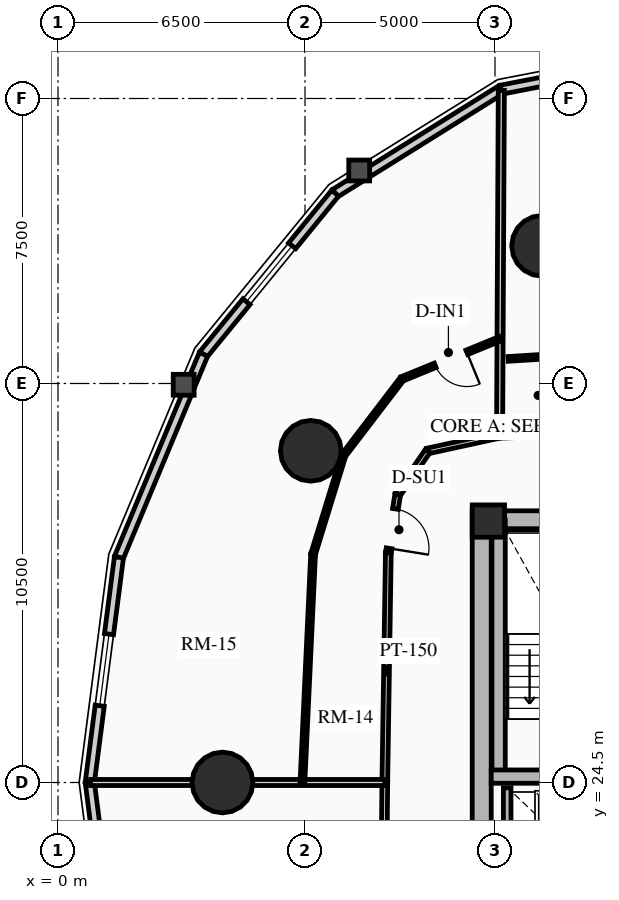
"""IFC4 building model, lengths in metres.
Left out: names, types, materials, properties, quantities, classifications, styles, units other than length and angle.
Written with IfcOpenShell. Run it as: python <this file> out.ifc"""

import sys

from ifc_helpers import new_model, si_unit, direction, frame, frame_2d, origin, origin_2d, place, context, subcontext, project, spatial, rectangle, circle, extrude, source, transform, mapped, element, fill, save


model = new_model("IFC4")
c1 = context("Model", 3, precision=1e-05, world=origin(), true_north=direction((0.0, 1.0)))
c2 = subcontext(c1, "Body", "Model", "MODEL_VIEW")
j1 = project(units=[si_unit("LENGTHUNIT", "METRE"), si_unit("PLANEANGLEUNIT", "RADIAN")], contexts=[c1])
p1 = place(None, origin())
s1 = spatial("IfcSite", under=j1, at=p1, CompositionType="ELEMENT")
p2 = place(p1, origin())
s2 = spatial("IfcBuilding", under=s1, at=p2, CompositionType="ELEMENT")
p3 = place(p2, frame((0.0, 0.0, 62.74)))
s3 = spatial("IfcBuildingStorey", under=s2, at=p3, CompositionType="ELEMENT", Elevation=62.74)
p4 = place(p3, frame((11.15, 17.35, 0.0), z_axis=(0.0, 0.0, 1.0), x_axis=(0.0, 1.0, 0.0)))
e1 = element("IfcWall", 1, at=p4, inside=s3, PredefinedType="SHEAR", context=c2, shape_type="SweptSolid", body=[
    extrude(rectangle(XDim=14.3, YDim=0.5, at=frame_2d((7.15, 0.0))), origin(), (0.0, 0.0, 1.0), 2.91),
])
p5 = place(p3, frame((11.15, 31.4, 0.0), z_axis=(0.0, 0.0, 1.0), x_axis=(1.0, 0.0, 0.0)))
e2 = element("IfcWall", 2, at=p5, inside=s3, PredefinedType="SHEAR", context=c2, shape_type="SweptSolid", body=[
    extrude(rectangle(XDim=10.7, YDim=0.5, at=frame_2d((5.35, 0.0))), origin(), (0.0, 0.0, 1.0), 2.91),
])
m1 = source(origin(), c2, "Body", "SweptSolid", [
    extrude(rectangle(XDim=1.5, YDim=2.02, at=frame_2d((0.75, 1.01))), frame((0.0, 0.26, 0.0), z_axis=(0.0, -1.0, 0.0), x_axis=(1.0, 0.0, 0.0)), (0.0, 0.0, 1.0), 0.52),
])
p6 = place(p5, frame((4.6, 0.0, 0.0)))
e3 = element("IfcOpeningElement", 3, at=p6, cuts=e2, PredefinedType="OPENING", context=c2, shape_type="MappedRepresentation", body=[
    mapped(m1, transform((0.0, 0.0, 0.0), x_axis=(1.0, 0.0, 0.0), y_axis=(0.0, 1.0, 0.0), z_axis=(0.0, 0.0, 1.0), scale=1.0)),
])
p7 = place(p3, frame((11.595, 24.655, 0.0), z_axis=(0.0, 0.0, 1.0), x_axis=(0.0, 1.0, 0.0)))
e4 = element("IfcWall", 4, at=p7, inside=s3, PredefinedType="SHEAR", context=c2, shape_type="SweptSolid", body=[
    extrude(rectangle(XDim=6.745, YDim=0.35, at=frame_2d((3.373, 0.0))), origin(), (0.0, 0.0, 1.0), 2.91),
])
p8 = place(p3, frame((11.4, 24.655, 0.0), z_axis=(0.0, 0.0, 1.0), x_axis=(1.0, 0.0, 0.0)))
e5 = element("IfcWall", 5, at=p8, inside=s3, PredefinedType="SHEAR", context=c2, shape_type="SweptSolid", body=[
    extrude(rectangle(XDim=3.285, YDim=0.35, at=frame_2d((1.643, 0.0))), origin(), (0.0, 0.0, 1.0), 2.91),
])
p9 = place(p3, frame((11.325, 31.38, 0.0), z_axis=(0.0, 0.0, 1.0), x_axis=(1.0, 0.0, 0.0)))
e6 = element("IfcColumn", 6, at=p9, inside=s3, PredefinedType="COLUMN", context=c2, shape_type="SweptSolid", body=[
    extrude(rectangle(XDim=0.85, YDim=0.85, at=origin_2d()), origin(), (0.0, 0.0, 1.0), 2.91),
])
for number, where, z_axis, x_axis in (
    (7, (12.739, 38.623, 0.0), (0.0, 0.0, 1.0), (1.0, 0.0, 0.0)),
    (8, (6.653, 33.229, 0.0), (0.0, 0.0, 1.0), (1.0, 0.0, 0.0)),
    (9, (4.328, 24.5, 0.0), (0.0, 0.0, 1.0), (1.0, 0.0, 0.0)),
):
    element("IfcColumn", number, at=place(p3, frame(where, z_axis=z_axis, x_axis=x_axis)), inside=s3, PredefinedType="USERDEFINED", context=c2, shape_type="SweptSolid", body=[
        extrude(circle(Radius=0.8, at=origin_2d()), origin(), (0.0, 0.0, 1.0), 2.91),
    ])
p10 = place(p3, frame((11.66, 42.732, 0.0), z_axis=(0.0, 0.0, 1.0), x_axis=(0.981725274071, 0.190303668512, 0.0)))
e10 = element("IfcWall", 10, at=p10, inside=s3, PredefinedType="SOLIDWALL", context=c2, shape_type="SweptSolid", body=[
    extrude(rectangle(XDim=4.93, YDim=0.24, at=frame_2d((2.465, 0.0))), origin(), (0.0, 0.0, 1.0), 2.079),
])
m2 = source(origin(), c2, "Body", "SweptSolid", [
    extrude(rectangle(XDim=2.2, YDim=1.35, at=frame_2d((1.1, 0.675))), frame((0.0, 0.13, 0.0), z_axis=(0.0, -1.0, 0.0), x_axis=(1.0, 0.0, 0.0)), (0.0, 0.0, 1.0), 0.26),
])
p11 = place(p10, frame((1.365, 0.0, 0.65)))
e11 = element("IfcOpeningElement", 11, at=p11, cuts=e10, PredefinedType="OPENING", context=c2, shape_type="MappedRepresentation", body=[
    mapped(m2, transform((0.0, 0.0, 0.0), x_axis=(1.0, 0.0, 0.0), y_axis=(0.0, 1.0, 0.0), z_axis=(0.0, 0.0, 1.0), scale=1.0)),
])
p12 = place(p3, frame((7.293, 40.009, 0.0), z_axis=(0.0, 0.0, 1.0), x_axis=(0.848533613342, 0.529141481107, 0.0)))
e12 = element("IfcWall", 12, at=p12, inside=s3, PredefinedType="SOLIDWALL", context=c2, shape_type="SweptSolid", body=[
    extrude(rectangle(XDim=5.146, YDim=0.24, at=frame_2d((2.573, 0.0))), origin(), (0.0, 0.0, 1.0), 2.079),
])
p13 = place(p3, frame((3.828, 35.768, 0.0), z_axis=(0.0, 0.0, 1.0), x_axis=(0.632713287022, 0.77438614168, 0.0)))
e13 = element("IfcWall", 13, at=p13, inside=s3, PredefinedType="SOLIDWALL", context=c2, shape_type="SweptSolid", body=[
    extrude(rectangle(XDim=5.477, YDim=0.24, at=frame_2d((2.738, 0.0))), origin(), (0.0, 0.0, 1.0), 2.079),
])
m3 = source(origin(), c2, "Body", "SweptSolid", [
    extrude(rectangle(XDim=1.9, YDim=1.35, at=frame_2d((0.95, 0.675))), frame((0.0, 0.13, 0.0), z_axis=(0.0, -1.0, 0.0), x_axis=(1.0, 0.0, 0.0)), (0.0, 0.0, 1.0), 0.26),
])
p14 = place(p13, frame((1.788, 0.0, 0.65)))
e14 = element("IfcOpeningElement", 14, at=p14, cuts=e13, PredefinedType="OPENING", context=c2, shape_type="MappedRepresentation", body=[
    mapped(m3, transform((0.0, 0.0, 0.0), x_axis=(1.0, 0.0, 0.0), y_axis=(0.0, 1.0, 0.0), z_axis=(0.0, 0.0, 1.0), scale=1.0)),
])
p15 = place(p3, frame((1.604, 30.424, 0.0), z_axis=(0.0, 0.0, 1.0), x_axis=(0.384348836956, 0.923187939442, 0.0)))
e15 = element("IfcWall", 15, at=p15, inside=s3, PredefinedType="SOLIDWALL", context=c2, shape_type="SweptSolid", body=[
    extrude(rectangle(XDim=5.789, YDim=0.24, at=frame_2d((2.894, 0.0))), origin(), (0.0, 0.0, 1.0), 2.079),
])
p16 = place(p3, frame((0.837, 24.5, 0.0), z_axis=(0.0, 0.0, 1.0), x_axis=(0.128339641463, 0.991730274031, 0.0)))
e16 = element("IfcWall", 16, at=p16, inside=s3, PredefinedType="SOLIDWALL", context=c2, shape_type="SweptSolid", body=[
    extrude(rectangle(XDim=5.973, YDim=0.24, at=frame_2d((2.987, 0.0))), origin(), (0.0, 0.0, 1.0), 2.079),
])
p17 = place(p16, frame((2.037, 0.0, 0.65)))
e17 = element("IfcOpeningElement", 17, at=p17, cuts=e16, PredefinedType="OPENING", context=c2, shape_type="MappedRepresentation", body=[
    mapped(m3, transform((0.0, 0.0, 0.0), x_axis=(1.0, 0.0, 0.0), y_axis=(0.0, 1.0, 0.0), z_axis=(0.0, 0.0, 1.0), scale=1.0)),
])
p18 = place(p3, frame((1.604, 18.576, 0.0), z_axis=(0.0, 0.0, 1.0), x_axis=(-0.128339641463, 0.991730274031, 0.0)))
e18 = element("IfcWall", 18, at=p18, inside=s3, PredefinedType="SOLIDWALL", context=c2, shape_type="SweptSolid", body=[
    extrude(rectangle(XDim=5.973, YDim=0.24, at=frame_2d((2.987, 0.0))), origin(), (0.0, 0.0, 1.0), 2.079),
])
p19 = place(p3, frame((11.82, 21.92, 0.0), z_axis=(0.0, 0.0, 1.0), x_axis=(0.0, 1.0, 0.0)))
e19 = element("IfcWall", 19, at=p19, inside=s3, PredefinedType="SHEAR", context=c2, shape_type="SweptSolid", body=[
    extrude(rectangle(XDim=2.44, YDim=0.2, at=frame_2d((1.22, 0.0))), origin(), (0.0, 0.0, 1.0), 2.91),
])
p20 = place(p3, frame((18.143, 33.86, 0.0), z_axis=(0.0, 0.0, 1.0), x_axis=(-0.999419208319, -0.034077060363, 0.0)))
e20 = element("IfcWall", 20, at=p20, inside=s3, PredefinedType="PARTITIONING", context=c2, shape_type="SweptSolid", body=[
    extrude(rectangle(XDim=6.527, YDim=0.15, at=frame_2d((3.263, 0.0))), origin(), (0.0, 0.0, 1.0), 2.079),
])
p21 = place(p3, frame((11.62, 33.637, 0.0), z_axis=(0.0, 0.0, 1.0), x_axis=(-0.97702579435, -0.213121085711, 0.0)))
e21 = element("IfcWall", 21, at=p21, inside=s3, PredefinedType="PARTITIONING", context=c2, shape_type="SweptSolid", body=[
    extrude(rectangle(XDim=1.935, YDim=0.15, at=frame_2d((0.967, 0.0))), origin(), (0.0, 0.0, 1.0), 2.079),
])
p22 = place(p3, frame((9.729, 33.225, 0.0), z_axis=(0.0, 0.0, 1.0), x_axis=(-0.567183649484, -0.82359134755, 0.0)))
e22 = element("IfcWall", 22, at=p22, inside=s3, PredefinedType="PARTITIONING", context=c2, shape_type="SweptSolid", body=[
    extrude(rectangle(XDim=1.392, YDim=0.15, at=frame_2d((0.696, 0.0))), origin(), (0.0, 0.0, 1.0), 2.079),
])
p23 = place(p3, frame((8.94, 32.078, 0.0), z_axis=(0.0, 0.0, 1.0), x_axis=(-0.159148467753, -0.98725466077, 0.0)))
e23 = element("IfcWall", 23, at=p23, inside=s3, PredefinedType="PARTITIONING", context=c2, shape_type="SweptSolid", body=[
    extrude(rectangle(XDim=1.554, YDim=0.15, at=frame_2d((0.777, 0.0))), origin(), (0.0, 0.0, 1.0), 2.125),
])
m4 = source(origin(), c2, "Body", "SweptSolid", [
    extrude(rectangle(XDim=1.05, YDim=2.015, at=frame_2d((0.525, 1.007))), frame((0.0, 0.085, 0.0), z_axis=(0.0, -1.0, 0.0), x_axis=(1.0, 0.0, 0.0)), (0.0, 0.0, 1.0), 0.17),
])
p24 = place(p23, frame((0.384, 0.0, 0.0)))
e24 = element("IfcOpeningElement", 24, at=p24, cuts=e23, PredefinedType="OPENING", context=c2, shape_type="MappedRepresentation", body=[
    mapped(m4, transform((0.0, 0.0, 0.0), x_axis=(1.0, 0.0, 0.0), y_axis=(0.0, 1.0, 0.0), z_axis=(0.0, 0.0, 1.0), scale=1.0)),
])
p25 = place(p3, frame((8.693, 30.544, 0.0), z_axis=(0.0, 0.0, 1.0), x_axis=(-0.015307007986, -0.99988284089, 0.0)))
e25 = element("IfcWall", 25, at=p25, inside=s3, PredefinedType="PARTITIONING", context=c2, shape_type="SweptSolid", body=[
    extrude(rectangle(XDim=6.045, YDim=0.15, at=frame_2d((3.022, 0.0))), origin(), (0.0, 0.0, 1.0), 2.555),
])
p26 = place(p3, frame((8.6, 24.5, 0.0), z_axis=(0.0, 0.0, 1.0), x_axis=(-0.010023665349, -0.999949761805, 0.0)))
e26 = element("IfcWall", 26, at=p26, inside=s3, PredefinedType="PARTITIONING", context=c2, shape_type="SweptSolid", body=[
    extrude(rectangle(XDim=6.162, YDim=0.15, at=frame_2d((3.081, 0.0))), origin(), (0.0, 0.0, 1.0), 2.079),
])
p27 = place(p26, frame((2.556, 0.0, 0.0)))
e27 = element("IfcOpeningElement", 27, at=p27, cuts=e26, PredefinedType="OPENING", context=c2, shape_type="MappedRepresentation", body=[
    mapped(m4, transform((0.0, 0.0, 0.0), x_axis=(1.0, 0.0, 0.0), y_axis=(0.0, 1.0, 0.0), z_axis=(0.0, 0.0, 1.0), scale=1.0)),
])
p28 = place(p3, frame((11.62, 33.637, 0.0), z_axis=(0.0, 0.0, 1.0), x_axis=(0.00508426969, 0.999987075017, 0.0)))
e28 = element("IfcWall", 28, at=p28, inside=s3, PredefinedType="PARTITIONING", context=c2, shape_type="SweptSolid", body=[
    extrude(rectangle(XDim=9.075, YDim=0.16, at=frame_2d((4.538, 0.0))), origin(), (0.0, 0.0, 1.0), 2.079),
])
p29 = place(p3, frame((8.6, 24.5, 0.0), z_axis=(0.0, 0.0, 1.0), x_axis=(-1.0, 0.0, 0.0)))
e29 = element("IfcWall", 29, at=p29, inside=s3, PredefinedType="PARTITIONING", context=c2, shape_type="SweptSolid", body=[
    extrude(rectangle(XDim=7.743, YDim=0.16, at=frame_2d((3.872, 0.0))), origin(), (0.0, 0.0, 1.0), 2.079),
])
p30 = place(p3, frame((14.798, 35.829, 0.0), z_axis=(0.0, 0.0, 1.0), x_axis=(-0.998098224752, -0.061643602637, 0.0)))
e30 = element("IfcWall", 30, at=p30, inside=s3, PredefinedType="PARTITIONING", context=c2, shape_type="SweptSolid", body=[
    extrude(rectangle(XDim=2.958, YDim=0.125, at=frame_2d((1.479, 0.0))), origin(), (0.0, 0.0, 1.0), 2.079),
])
m5 = source(origin(), c2, "Body", "SweptSolid", [
    extrude(rectangle(XDim=0.9, YDim=2.005, at=frame_2d((0.45, 1.002))), frame((0.0, 0.073, 0.0), z_axis=(0.0, -1.0, 0.0), x_axis=(1.0, 0.0, 0.0)), (0.0, 0.0, 1.0), 0.145),
])
p31 = place(p30, frame((0.12, 0.0, 0.0)))
e31 = element("IfcOpeningElement", 31, at=p31, cuts=e30, PredefinedType="OPENING", context=c2, shape_type="MappedRepresentation", body=[
    mapped(m5, transform((0.0, 0.0, 0.0), x_axis=(1.0, 0.0, 0.0), y_axis=(0.0, 1.0, 0.0), z_axis=(0.0, 0.0, 1.0), scale=1.0)),
])
p32 = place(p3, frame((11.633, 36.178, 0.0), z_axis=(0.0, 0.0, 1.0), x_axis=(-0.92528752303, -0.379266396779, 0.0)))
e32 = element("IfcWall", 32, at=p32, inside=s3, PredefinedType="PARTITIONING", context=c2, shape_type="SweptSolid", body=[
    extrude(rectangle(XDim=2.791, YDim=0.125, at=frame_2d((1.395, 0.0))), origin(), (0.0, 0.0, 1.0), 2.079),
])
p33 = place(p32, frame((0.945, 0.0, 0.0)))
e33 = element("IfcOpeningElement", 33, at=p33, cuts=e32, PredefinedType="OPENING", context=c2, shape_type="MappedRepresentation", body=[
    mapped(m5, transform((0.0, 0.0, 0.0), x_axis=(1.0, 0.0, 0.0), y_axis=(0.0, 1.0, 0.0), z_axis=(0.0, 0.0, 1.0), scale=1.0)),
])
p34 = place(p3, frame((9.051, 35.12, 0.0), z_axis=(0.0, 0.0, 1.0), x_axis=(-0.607256827378, -0.79450559822, 0.0)))
e34 = element("IfcWall", 34, at=p34, inside=s3, PredefinedType="PARTITIONING", context=c2, shape_type="SweptSolid", body=[
    extrude(rectangle(XDim=2.532, YDim=0.125, at=frame_2d((1.266, 0.0))), origin(), (0.0, 0.0, 1.0), 2.079),
])
p35 = place(p3, frame((7.513, 33.108, 0.0), z_axis=(0.0, 0.0, 1.0), x_axis=(-0.294167851511, -0.955753773279, 0.0)))
e35 = element("IfcWall", 35, at=p35, inside=s3, PredefinedType="PARTITIONING", context=c2, shape_type="SweptSolid", body=[
    extrude(rectangle(XDim=2.72, YDim=0.125, at=frame_2d((1.36, 0.0))), origin(), (0.0, 0.0, 1.0), 2.079),
])
p36 = place(p3, frame((6.713, 30.509, 0.0), z_axis=(0.0, 0.0, 1.0), x_axis=(-0.046755247216, -0.998906375422, 0.0)))
e36 = element("IfcWall", 36, at=p36, inside=s3, PredefinedType="PARTITIONING", context=c2, shape_type="SweptSolid", body=[
    extrude(rectangle(XDim=6.015, YDim=0.125, at=frame_2d((3.008, 0.0))), origin(), (0.0, 0.0, 1.0), 2.555),
])
m6 = source(origin(), c2, "Body", "SweptSolid", [
    extrude(rectangle(XDim=1.9, YDim=1.35, at=frame_2d((0.95, 0.675))), frame((0.0, 0.03, 0.0), z_axis=(0.0, -1.0, 0.0), x_axis=(1.0, 0.0, 0.0)), (0.0, 0.0, 1.0), 0.06),
])
p37 = place(p14, origin())
e37 = element("IfcWindow", 37, at=p37, inside=s3, PartitioningType="DOUBLE_PANEL_VERTICAL", PredefinedType="WINDOW", context=c2, shape_type="MappedRepresentation", body=[
    mapped(m6, transform((0.0, 0.0, 0.0), x_axis=(1.0, 0.0, 0.0), y_axis=(0.0, 1.0, 0.0), z_axis=(0.0, 0.0, 1.0), scale=1.0)),
])
fill(e14, e37)
p38 = place(p17, origin())
e38 = element("IfcWindow", 38, at=p38, inside=s3, PartitioningType="DOUBLE_PANEL_VERTICAL", PredefinedType="WINDOW", context=c2, shape_type="MappedRepresentation", body=[
    mapped(m6, transform((0.0, 0.0, 0.0), x_axis=(1.0, 0.0, 0.0), y_axis=(0.0, 1.0, 0.0), z_axis=(0.0, 0.0, 1.0), scale=1.0)),
])
fill(e17, e38)
m7 = source(origin(), c2, "Body", "SweptSolid", [
    extrude(rectangle(XDim=1.05, YDim=2.015, at=frame_2d((0.525, 1.007))), frame((0.0, 0.025, 0.0), z_axis=(0.0, -1.0, 0.0), x_axis=(1.0, 0.0, 0.0)), (0.0, 0.0, 1.0), 0.05),
])
p39 = place(p24, origin())
e39 = element("IfcDoor", 39, at=p39, inside=s3, OperationType="SINGLE_SWING_RIGHT", PredefinedType="DOOR", context=c2, shape_type="MappedRepresentation", body=[
    mapped(m7, transform((0.0, 0.0, 0.0), x_axis=(1.0, 0.0, 0.0), y_axis=(0.0, 1.0, 0.0), z_axis=(0.0, 0.0, 1.0), scale=1.0)),
])
fill(e24, e39)
m8 = source(origin(), c2, "Body", "SweptSolid", [
    extrude(rectangle(XDim=0.9, YDim=2.005, at=frame_2d((0.45, 1.002))), frame((0.0, 0.025, 0.0), z_axis=(0.0, -1.0, 0.0), x_axis=(1.0, 0.0, 0.0)), (0.0, 0.0, 1.0), 0.05),
])
p40 = place(p33, origin())
e40 = element("IfcDoor", 40, at=p40, inside=s3, OperationType="SINGLE_SWING_LEFT", PredefinedType="DOOR", context=c2, shape_type="MappedRepresentation", body=[
    mapped(m8, transform((0.0, 0.0, 0.0), x_axis=(1.0, 0.0, 0.0), y_axis=(0.0, 1.0, 0.0), z_axis=(0.0, 0.0, 1.0), scale=1.0)),
])
fill(e33, e40)
save(model, sys.argv[1])
